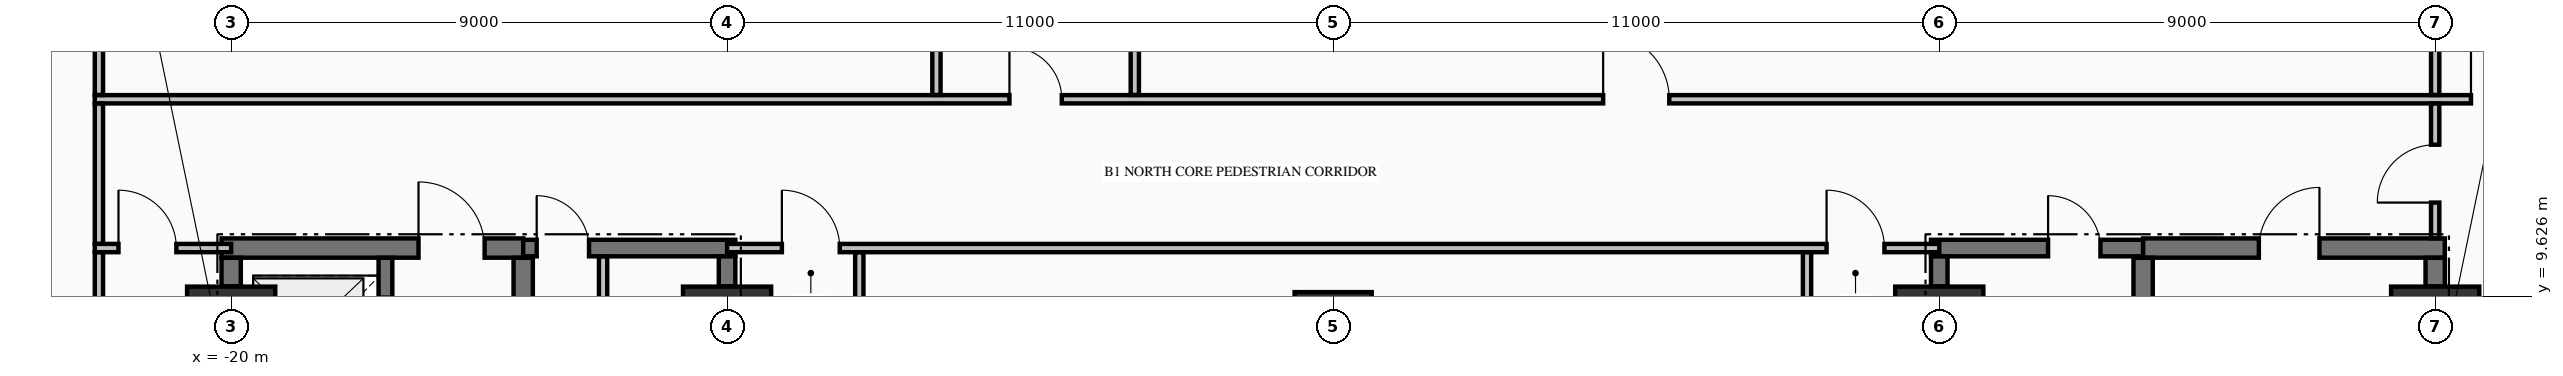
"""IFC4 building model, lengths in metres.
Left out: names, types, materials, properties, quantities, classifications, styles, units other than length and angle.
Written with IfcOpenShell. Run it as: python <this file> out.ifc"""

import sys

from ifc_helpers import new_model, si_unit, direction, frame, frame_2d, origin, origin_2d, place, context, subcontext, project, spatial, rectangle, extrude, element, fill, save


model = new_model("IFC4")
c1 = context("Model", 3, precision=1e-05, world=origin(), true_north=direction((0.0, 1.0)))
c2 = subcontext(c1, "Body", "Model", "MODEL_VIEW")
j1 = project(units=[si_unit("LENGTHUNIT", "METRE"), si_unit("PLANEANGLEUNIT", "RADIAN")], contexts=[c1])
p1 = place(None, origin())
s1 = spatial("IfcSite", under=j1, at=p1, CompositionType="ELEMENT")
p2 = place(p1, origin())
s2 = spatial("IfcBuilding", under=s1, at=p2, CompositionType="ELEMENT")
p3 = place(p2, frame((0.0, 0.0, -4.55)))
s3 = spatial("IfcBuildingStorey", under=s2, at=p3, CompositionType="ELEMENT", Elevation=-4.55)
for number, where, z_axis, x_axis in (
    (1, (-20.0, 9.0, 0.0), (0.0, 0.0, 1.0), (1.0, 0.0, 0.0)),
    (2, (-11.0, 9.0, 0.0), (0.0, 0.0, 1.0), (1.0, 0.0, 0.0)),
):
    element("IfcColumn", number, at=place(p3, frame(where, z_axis=z_axis, x_axis=x_axis)), inside=s3, PredefinedType="COLUMN", context=c2, shape_type="SweptSolid", body=[
        extrude(rectangle(XDim=1.6, YDim=1.6, at=origin_2d()), origin(), (0.0, 0.0, 1.0), 4.2),
    ])
p4 = place(p3, frame((0.0, 9.0, 0.0), z_axis=(0.0, 0.0, 1.0), x_axis=(1.0, 0.0, 0.0)))
e3 = element("IfcColumn", 3, at=p4, inside=s3, PredefinedType="COLUMN", context=c2, shape_type="SweptSolid", body=[
    extrude(rectangle(XDim=1.4, YDim=1.4, at=origin_2d()), origin(), (0.0, 0.0, 1.0), 4.2),
])
for number, where, z_axis, x_axis in (
    (4, (11.0, 9.0, 0.0), (0.0, 0.0, 1.0), (1.0, 0.0, 0.0)),
    (5, (20.0, 9.0, 0.0), (0.0, 0.0, 1.0), (1.0, 0.0, 0.0)),
):
    element("IfcColumn", number, at=place(p3, frame(where, z_axis=z_axis, x_axis=x_axis)), inside=s3, PredefinedType="COLUMN", context=c2, shape_type="SweptSolid", body=[
        extrude(rectangle(XDim=1.6, YDim=1.6, at=origin_2d()), origin(), (0.0, 0.0, 1.0), 4.2),
    ])
p5 = place(p3, frame((-20.175, 10.5, 0.0), z_axis=(0.0, 0.0, 1.0), x_axis=(1.0, 0.0, 0.0)))
e6 = element("IfcWall", 6, at=p5, inside=s3, PredefinedType="SHEAR", context=c2, shape_type="SweptSolid", body=[
    extrude(rectangle(XDim=5.475, YDim=0.35, at=frame_2d((2.738, 0.0))), origin(), (0.0, 0.0, 1.0), 4.2),
])
p6 = place(p5, frame((3.575, 0.0, 0.0)))
e7 = element("IfcOpeningElement", 7, at=p6, cuts=e6, PredefinedType="OPENING", context=c2, shape_type="SweptSolid", body=[
    extrude(rectangle(XDim=1.2, YDim=2.15, at=frame_2d((0.6, 1.075))), frame((0.0, 0.185, 0.0), z_axis=(0.0, -1.0, 0.0), x_axis=(1.0, 0.0, 0.0)), (0.0, 0.0, 1.0), 0.37),
])
p7 = place(p3, frame((-14.7, 10.5, 0.0), z_axis=(0.0, 0.0, 1.0), x_axis=(1.0, 0.0, 0.0)))
e8 = element("IfcWall", 8, at=p7, inside=s3, PredefinedType="SHEAR", context=c2, shape_type="SweptSolid", body=[
    extrude(rectangle(XDim=3.85, YDim=0.3, at=frame_2d((1.925, 0.0))), origin(), (0.0, 0.0, 1.0), 4.2),
])
p8 = place(p7, frame((0.245, 0.0, 0.0)))
e9 = element("IfcOpeningElement", 9, at=p8, cuts=e8, PredefinedType="OPENING", context=c2, shape_type="SweptSolid", body=[
    extrude(rectangle(XDim=0.95, YDim=2.15, at=frame_2d((0.475, 1.075))), frame((0.0, 0.16, 0.0), z_axis=(0.0, -1.0, 0.0), x_axis=(1.0, 0.0, 0.0)), (0.0, 0.0, 1.0), 0.32),
])
p9 = place(p3, frame((10.85, 10.5, 0.0), z_axis=(0.0, 0.0, 1.0), x_axis=(1.0, 0.0, 0.0)))
e10 = element("IfcWall", 10, at=p9, inside=s3, PredefinedType="SHEAR", context=c2, shape_type="SweptSolid", body=[
    extrude(rectangle(XDim=3.85, YDim=0.3, at=frame_2d((1.925, 0.0))), origin(), (0.0, 0.0, 1.0), 4.2),
])
p10 = place(p9, frame((2.125, 0.0, 0.0)))
e11 = element("IfcOpeningElement", 11, at=p10, cuts=e10, PredefinedType="OPENING", context=c2, shape_type="SweptSolid", body=[
    extrude(rectangle(XDim=0.95, YDim=2.15, at=frame_2d((0.475, 1.075))), frame((0.0, 0.16, 0.0), z_axis=(0.0, -1.0, 0.0), x_axis=(1.0, 0.0, 0.0)), (0.0, 0.0, 1.0), 0.32),
])
p11 = place(p3, frame((14.7, 10.5, 0.0), z_axis=(0.0, 0.0, 1.0), x_axis=(1.0, 0.0, 0.0)))
e12 = element("IfcWall", 12, at=p11, inside=s3, PredefinedType="SHEAR", context=c2, shape_type="SweptSolid", body=[
    extrude(rectangle(XDim=5.475, YDim=0.35, at=frame_2d((2.738, 0.0))), origin(), (0.0, 0.0, 1.0), 4.2),
])
p12 = place(p11, frame((2.1, 0.0, 0.0)))
e13 = element("IfcOpeningElement", 13, at=p12, cuts=e12, PredefinedType="OPENING", context=c2, shape_type="SweptSolid", body=[
    extrude(rectangle(XDim=1.1, YDim=2.15, at=frame_2d((0.55, 1.075))), frame((0.0, 0.185, 0.0), z_axis=(0.0, -1.0, 0.0), x_axis=(1.0, 0.0, 0.0)), (0.0, 0.0, 1.0), 0.37),
])
p13 = place(p3, frame((-22.475, 10.5, 0.0), z_axis=(0.0, 0.0, 1.0), x_axis=(1.0, 0.0, 0.0)))
e14 = element("IfcWall", 14, at=p13, inside=s3, PredefinedType="PARTITIONING", context=c2, shape_type="SweptSolid", body=[
    extrude(rectangle(XDim=2.475, YDim=0.15, at=frame_2d((1.238, 0.0))), origin(), (0.0, 0.0, 1.0), 4.2),
])
p14 = place(p13, frame((0.43, 0.0, 0.0)))
e15 = element("IfcOpeningElement", 15, at=p14, cuts=e14, PredefinedType="OPENING", context=c2, shape_type="SweptSolid", body=[
    extrude(rectangle(XDim=1.05, YDim=2.15, at=frame_2d((0.525, 1.075))), frame((0.0, 0.085, 0.0), z_axis=(0.0, -1.0, 0.0), x_axis=(1.0, 0.0, 0.0)), (0.0, 0.0, 1.0), 0.17),
])
p15 = place(p3, frame((-11.0, 10.5, 0.0), z_axis=(0.0, 0.0, 1.0), x_axis=(1.0, 0.0, 0.0)))
e16 = element("IfcWall", 16, at=p15, inside=s3, PredefinedType="PARTITIONING", context=c2, shape_type="SweptSolid", body=[
    extrude(rectangle(XDim=22.0, YDim=0.15, at=frame_2d((11.0, 0.0))), origin(), (0.0, 0.0, 1.0), 4.2),
])
p16 = place(p15, frame((0.995, 0.0, 0.0)))
e17 = element("IfcOpeningElement", 17, at=p16, cuts=e16, PredefinedType="OPENING", context=c2, shape_type="SweptSolid", body=[
    extrude(rectangle(XDim=1.05, YDim=2.15, at=frame_2d((0.525, 1.075))), frame((0.0, 0.085, 0.0), z_axis=(0.0, -1.0, 0.0), x_axis=(1.0, 0.0, 0.0)), (0.0, 0.0, 1.0), 0.17),
])
p17 = place(p15, frame((19.955, 0.0, 0.0)))
e18 = element("IfcOpeningElement", 18, at=p17, cuts=e16, PredefinedType="OPENING", context=c2, shape_type="SweptSolid", body=[
    extrude(rectangle(XDim=1.05, YDim=2.15, at=frame_2d((0.525, 1.075))), frame((0.0, 0.085, 0.0), z_axis=(0.0, -1.0, 0.0), x_axis=(1.0, 0.0, 0.0)), (0.0, 0.0, 1.0), 0.17),
])
p18 = place(p3, frame((-22.475, 13.2, 0.0), z_axis=(0.0, 0.0, 1.0), x_axis=(1.0, 0.0, 0.0)))
e19 = element("IfcWall", 19, at=p18, inside=s3, PredefinedType="PARTITIONING", context=c2, shape_type="SweptSolid", body=[
    extrude(rectangle(XDim=56.197, YDim=0.15, at=frame_2d((28.099, 0.0))), origin(), (0.0, 0.0, 1.0), 4.2),
])
p19 = place(p18, frame((43.125, 0.0, 0.0)))
e20 = element("IfcOpeningElement", 20, at=p19, cuts=e19, PredefinedType="OPENING", context=c2, shape_type="SweptSolid", body=[
    extrude(rectangle(XDim=1.1, YDim=2.15, at=frame_2d((0.55, 1.075))), frame((0.0, 0.085, 0.0), z_axis=(0.0, -1.0, 0.0), x_axis=(1.0, 0.0, 0.0)), (0.0, 0.0, 1.0), 0.17),
])
p20 = place(p18, frame((27.375, 0.0, 0.0)))
e21 = element("IfcOpeningElement", 21, at=p20, cuts=e19, PredefinedType="OPENING", context=c2, shape_type="SweptSolid", body=[
    extrude(rectangle(XDim=1.2, YDim=2.15, at=frame_2d((0.6, 1.075))), frame((0.0, 0.085, 0.0), z_axis=(0.0, -1.0, 0.0), x_axis=(1.0, 0.0, 0.0)), (0.0, 0.0, 1.0), 0.17),
])
p21 = place(p18, frame((46.375, 0.0, 0.0)))
e22 = element("IfcOpeningElement", 22, at=p21, cuts=e19, PredefinedType="OPENING", context=c2, shape_type="SweptSolid", body=[
    extrude(rectangle(XDim=1.2, YDim=2.15, at=frame_2d((0.6, 1.075))), frame((0.0, 0.085, 0.0), z_axis=(0.0, -1.0, 0.0), x_axis=(1.0, 0.0, 0.0)), (0.0, 0.0, 1.0), 0.17),
])
p22 = place(p18, frame((16.6, 0.0, 0.0)))
e23 = element("IfcOpeningElement", 23, at=p22, cuts=e19, PredefinedType="OPENING", context=c2, shape_type="SweptSolid", body=[
    extrude(rectangle(XDim=0.95, YDim=2.15, at=frame_2d((0.475, 1.075))), frame((0.0, 0.085, 0.0), z_axis=(0.0, -1.0, 0.0), x_axis=(1.0, 0.0, 0.0)), (0.0, 0.0, 1.0), 0.17),
])
p23 = place(p3, frame((-20.0, 9.804, 0.0), z_axis=(0.0, 0.0, 1.0), x_axis=(0.0, 1.0, 0.0)))
e24 = element("IfcWall", 24, at=p23, inside=s3, PredefinedType="SHEAR", context=c2, shape_type="SweptSolid", body=[
    extrude(rectangle(XDim=0.519, YDim=0.35, at=frame_2d((0.26, 0.0))), origin(), (0.0, 0.0, 1.0), 4.2),
])
p24 = place(p3, frame((-17.2, 7.727, 0.0), z_axis=(0.0, 0.0, 1.0), x_axis=(0.0, 1.0, 0.0)))
e25 = element("IfcWall", 25, at=p24, inside=s3, PredefinedType="SOLIDWALL", context=c2, shape_type="SweptSolid", body=[
    extrude(rectangle(XDim=2.596, YDim=0.25, at=frame_2d((1.298, 0.0))), origin(), (0.0, 0.0, 1.0), 4.2),
])
p25 = place(p24, frame((0.773, 0.0, 0.0)))
e26 = element("IfcOpeningElement", 26, at=p25, cuts=e25, PredefinedType="OPENING", context=c2, shape_type="SweptSolid", body=[
    extrude(rectangle(XDim=1.1, YDim=2.2, at=frame_2d((0.55, 1.1))), frame((0.0, 0.135, 0.0), z_axis=(0.0, -1.0, 0.0), x_axis=(1.0, 0.0, 0.0)), (0.0, 0.0, 1.0), 0.27),
])
p26 = place(p3, frame((-14.7, 5.852, 0.0), z_axis=(0.0, 0.0, 1.0), x_axis=(0.0, 1.0, 0.0)))
e27 = element("IfcWall", 27, at=p26, inside=s3, PredefinedType="SHEAR", context=c2, shape_type="SweptSolid", body=[
    extrude(rectangle(XDim=4.471, YDim=0.35, at=frame_2d((2.235, 0.0))), origin(), (0.0, 0.0, 1.0), 4.2),
])
for number, where, z_axis, x_axis in (
    (28, (-11.0, 9.804, 0.0), (0.0, 0.0, 1.0), (0.0, 1.0, 0.0)),
    (29, (11.0, 9.804, 0.0), (0.0, 0.0, 1.0), (0.0, 1.0, 0.0)),
):
    element("IfcWall", number, at=place(p3, frame(where, z_axis=z_axis, x_axis=x_axis)), inside=s3, PredefinedType="SHEAR", context=c2, shape_type="SweptSolid", body=[
        extrude(rectangle(XDim=0.544, YDim=0.3, at=frame_2d((0.272, 0.0))), origin(), (0.0, 0.0, 1.0), 4.2),
    ])
p27 = place(p3, frame((14.7, 5.852, 0.0), z_axis=(0.0, 0.0, 1.0), x_axis=(0.0, 1.0, 0.0)))
e30 = element("IfcWall", 30, at=p27, inside=s3, PredefinedType="SHEAR", context=c2, shape_type="SweptSolid", body=[
    extrude(rectangle(XDim=4.471, YDim=0.35, at=frame_2d((2.235, 0.0))), origin(), (0.0, 0.0, 1.0), 4.2),
])
p28 = place(p3, frame((20.0, 9.804, 0.0), z_axis=(0.0, 0.0, 1.0), x_axis=(0.0, 1.0, 0.0)))
e31 = element("IfcWall", 31, at=p28, inside=s3, PredefinedType="SHEAR", context=c2, shape_type="SweptSolid", body=[
    extrude(rectangle(XDim=0.519, YDim=0.35, at=frame_2d((0.26, 0.0))), origin(), (0.0, 0.0, 1.0), 4.2),
])
p29 = place(p3, frame((-22.4, -0.647, 0.0), z_axis=(0.0, 0.0, 1.0), x_axis=(0.0, 1.0, 0.0)))
e32 = element("IfcWall", 32, at=p29, inside=s3, PredefinedType="PARTITIONING", context=c2, shape_type="SweptSolid", body=[
    extrude(rectangle(XDim=11.069, YDim=0.15, at=frame_2d((5.535, 0.0))), origin(), (0.0, 0.0, 1.0), 4.2),
])
p30 = place(p29, frame((4.547, 0.0, 0.0)))
e33 = element("IfcOpeningElement", 33, at=p30, cuts=e32, PredefinedType="OPENING", context=c2, shape_type="SweptSolid", body=[
    extrude(rectangle(XDim=1.2, YDim=2.15, at=frame_2d((0.6, 1.075))), frame((0.0, 0.085, 0.0), z_axis=(0.0, -1.0, 0.0), x_axis=(1.0, 0.0, 0.0)), (0.0, 0.0, 1.0), 0.17),
])
p31 = place(p3, frame((-22.4, 10.578, 0.0), z_axis=(0.0, 0.0, 1.0), x_axis=(0.0, 1.0, 0.0)))
e34 = element("IfcWall", 34, at=p31, inside=s3, PredefinedType="PARTITIONING", context=c2, shape_type="SweptSolid", body=[
    extrude(rectangle(XDim=2.544, YDim=0.15, at=frame_2d((1.272, 0.0))), origin(), (0.0, 0.0, 1.0), 4.2),
])
p32 = place(p3, frame((-22.4, 13.278, 0.0), z_axis=(0.0, 0.0, 1.0), x_axis=(0.0, 1.0, 0.0)))
e35 = element("IfcWall", 35, at=p32, inside=s3, PredefinedType="PARTITIONING", context=c2, shape_type="SweptSolid", body=[
    extrude(rectangle(XDim=3.244, YDim=0.15, at=frame_2d((1.622, 0.0))), origin(), (0.0, 0.0, 1.0), 4.2),
])
p33 = place(p3, frame((-13.25, 5.853, 0.0), z_axis=(0.0, 0.0, 1.0), x_axis=(0.0, 1.0, 0.0)))
e36 = element("IfcWall", 36, at=p33, inside=s3, PredefinedType="PARTITIONING", context=c2, shape_type="SweptSolid", body=[
    extrude(rectangle(XDim=4.494, YDim=0.15, at=frame_2d((2.247, 0.0))), origin(), (0.0, 0.0, 1.0), 4.2),
])
p34 = place(p33, frame((1.472, 0.0, 0.0)))
e37 = element("IfcOpeningElement", 37, at=p34, cuts=e36, PredefinedType="OPENING", context=c2, shape_type="SweptSolid", body=[
    extrude(rectangle(XDim=0.95, YDim=2.15, at=frame_2d((0.475, 1.075))), frame((0.0, 0.085, 0.0), z_axis=(0.0, -1.0, 0.0), x_axis=(1.0, 0.0, 0.0)), (0.0, 0.0, 1.0), 0.17),
])
p35 = place(p3, frame((-8.6, 0.606, 0.0), z_axis=(0.0, 0.0, 1.0), x_axis=(0.0, 1.0, 0.0)))
e38 = element("IfcWall", 38, at=p35, inside=s3, PredefinedType="PARTITIONING", context=c2, shape_type="SweptSolid", body=[
    extrude(rectangle(XDim=9.816, YDim=0.15, at=frame_2d((4.908, 0.0))), origin(), (0.0, 0.0, 1.0), 3.242),
])
p36 = place(p35, frame((3.344, 0.0, 0.0)))
e39 = element("IfcOpeningElement", 39, at=p36, cuts=e38, PredefinedType="OPENING", context=c2, shape_type="SweptSolid", body=[
    extrude(rectangle(XDim=1.1, YDim=2.15, at=frame_2d((0.55, 1.075))), frame((0.0, 0.085, 0.0), z_axis=(0.0, -1.0, 0.0), x_axis=(1.0, 0.0, 0.0)), (0.0, 0.0, 1.0), 0.17),
])
for number, where, z_axis, x_axis in (
    (40, (-7.2, 13.278, 0.0), (0.0, 0.0, 1.0), (0.0, 1.0, 0.0)),
    (41, (-3.6, 13.278, 0.0), (0.0, 0.0, 1.0), (0.0, 1.0, 0.0)),
):
    element("IfcWall", number, at=place(p3, frame(where, z_axis=z_axis, x_axis=x_axis)), inside=s3, PredefinedType="PARTITIONING", context=c2, shape_type="SweptSolid", body=[
        extrude(rectangle(XDim=3.044, YDim=0.15, at=frame_2d((1.522, 0.0))), origin(), (0.0, 0.0, 1.0), 4.2),
    ])
p37 = place(p3, frame((8.6, 0.606, 0.0), z_axis=(0.0, 0.0, 1.0), x_axis=(0.0, 1.0, 0.0)))
e42 = element("IfcWall", 42, at=p37, inside=s3, PredefinedType="PARTITIONING", context=c2, shape_type="SweptSolid", body=[
    extrude(rectangle(XDim=9.816, YDim=0.15, at=frame_2d((4.908, 0.0))), origin(), (0.0, 0.0, 1.0), 3.242),
])
p38 = place(p37, frame((3.344, 0.0, 0.0)))
e43 = element("IfcOpeningElement", 43, at=p38, cuts=e42, PredefinedType="OPENING", context=c2, shape_type="SweptSolid", body=[
    extrude(rectangle(XDim=1.1, YDim=2.15, at=frame_2d((0.55, 1.075))), frame((0.0, 0.085, 0.0), z_axis=(0.0, -1.0, 0.0), x_axis=(1.0, 0.0, 0.0)), (0.0, 0.0, 1.0), 0.17),
])
p39 = place(p3, frame((20.0, 10.678, 0.0), z_axis=(0.0, 0.0, 1.0), x_axis=(0.0, 1.0, 0.0)))
e44 = element("IfcWall", 44, at=p39, inside=s3, PredefinedType="PARTITIONING", context=c2, shape_type="SweptSolid", body=[
    extrude(rectangle(XDim=2.444, YDim=0.15, at=frame_2d((1.222, 0.0))), origin(), (0.0, 0.0, 1.0), 3.242),
])
p40 = place(p39, frame((0.647, 0.0, 0.0)))
e45 = element("IfcOpeningElement", 45, at=p40, cuts=e44, PredefinedType="OPENING", context=c2, shape_type="SweptSolid", body=[
    extrude(rectangle(XDim=1.05, YDim=2.15, at=frame_2d((0.525, 1.075))), frame((0.0, 0.085, 0.0), z_axis=(0.0, -1.0, 0.0), x_axis=(1.0, 0.0, 0.0)), (0.0, 0.0, 1.0), 0.17),
])
p41 = place(p3, frame((20.0, 13.278, 0.0), z_axis=(0.0, 0.0, 1.0), x_axis=(0.0, 1.0, 0.0)))
e46 = element("IfcWall", 46, at=p41, inside=s3, PredefinedType="PARTITIONING", context=c2, shape_type="SweptSolid", body=[
    extrude(rectangle(XDim=1.916, YDim=0.15, at=frame_2d((0.958, 0.0))), origin(), (0.0, 0.0, 1.0), 3.242),
])
p42 = place(p8, origin())
e47 = element("IfcDoor", 47, at=p42, inside=s3, OperationType="SINGLE_SWING_LEFT", PredefinedType="DOOR", context=c2, shape_type="SweptSolid", body=[
    extrude(rectangle(XDim=0.95, YDim=2.15, at=frame_2d((0.475, 1.075))), frame((0.0, 0.025, 0.0), z_axis=(0.0, -1.0, 0.0), x_axis=(1.0, 0.0, 0.0)), (0.0, 0.0, 1.0), 0.05),
])
fill(e9, e47)
p43 = place(p10, origin())
e48 = element("IfcDoor", 48, at=p43, inside=s3, OperationType="SINGLE_SWING_LEFT", PredefinedType="DOOR", context=c2, shape_type="SweptSolid", body=[
    extrude(rectangle(XDim=0.95, YDim=2.15, at=frame_2d((0.475, 1.075))), frame((0.0, 0.025, 0.0), z_axis=(0.0, -1.0, 0.0), x_axis=(1.0, 0.0, 0.0)), (0.0, 0.0, 1.0), 0.05),
])
fill(e11, e48)
p44 = place(p6, origin())
e49 = element("IfcDoor", 49, at=p44, inside=s3, OperationType="SINGLE_SWING_LEFT", PredefinedType="DOOR", context=c2, shape_type="SweptSolid", body=[
    extrude(rectangle(XDim=1.2, YDim=2.15, at=frame_2d((0.6, 1.075))), frame((0.0, 0.025, 0.0), z_axis=(0.0, -1.0, 0.0), x_axis=(1.0, 0.0, 0.0)), (0.0, 0.0, 1.0), 0.05),
])
fill(e7, e49)
p45 = place(p12, origin())
e50 = element("IfcDoor", 50, at=p45, inside=s3, OperationType="SINGLE_SWING_RIGHT", PredefinedType="DOOR", context=c2, shape_type="SweptSolid", body=[
    extrude(rectangle(XDim=1.1, YDim=2.15, at=frame_2d((0.55, 1.075))), frame((0.0, 0.025, 0.0), z_axis=(0.0, -1.0, 0.0), x_axis=(1.0, 0.0, 0.0)), (0.0, 0.0, 1.0), 0.05),
])
fill(e13, e50)
p46 = place(p16, origin())
e51 = element("IfcDoor", 51, at=p46, inside=s3, OperationType="SINGLE_SWING_LEFT", PredefinedType="DOOR", context=c2, shape_type="SweptSolid", body=[
    extrude(rectangle(XDim=1.05, YDim=2.15, at=frame_2d((0.525, 1.075))), frame((0.0, 0.025, 0.0), z_axis=(0.0, -1.0, 0.0), x_axis=(1.0, 0.0, 0.0)), (0.0, 0.0, 1.0), 0.05),
])
fill(e17, e51)
p47 = place(p17, origin())
e52 = element("IfcDoor", 52, at=p47, inside=s3, OperationType="SINGLE_SWING_LEFT", PredefinedType="DOOR", context=c2, shape_type="SweptSolid", body=[
    extrude(rectangle(XDim=1.05, YDim=2.15, at=frame_2d((0.525, 1.075))), frame((0.0, 0.025, 0.0), z_axis=(0.0, -1.0, 0.0), x_axis=(1.0, 0.0, 0.0)), (0.0, 0.0, 1.0), 0.05),
])
fill(e18, e52)
p48 = place(p14, origin())
e53 = element("IfcDoor", 53, at=p48, inside=s3, OperationType="SINGLE_SWING_LEFT", PredefinedType="DOOR", context=c2, shape_type="SweptSolid", body=[
    extrude(rectangle(XDim=1.05, YDim=2.15, at=frame_2d((0.525, 1.075))), frame((0.0, 0.025, 0.0), z_axis=(0.0, -1.0, 0.0), x_axis=(1.0, 0.0, 0.0)), (0.0, 0.0, 1.0), 0.05),
])
fill(e15, e53)
p49 = place(p40, origin())
e54 = element("IfcDoor", 54, at=p49, inside=s3, OperationType="SINGLE_SWING_LEFT", PredefinedType="DOOR", context=c2, shape_type="SweptSolid", body=[
    extrude(rectangle(XDim=1.05, YDim=2.15, at=frame_2d((0.525, 1.075))), frame((0.0, 0.025, 0.0), z_axis=(0.0, -1.0, 0.0), x_axis=(1.0, 0.0, 0.0)), (0.0, 0.0, 1.0), 0.05),
])
fill(e45, e54)
p50 = place(p19, origin())
e55 = element("IfcDoor", 55, at=p50, inside=s3, OperationType="SINGLE_SWING_LEFT", PredefinedType="DOOR", context=c2, shape_type="SweptSolid", body=[
    extrude(rectangle(XDim=1.1, YDim=2.15, at=frame_2d((0.55, 1.075))), frame((0.0, 0.025, 0.0), z_axis=(0.0, -1.0, 0.0), x_axis=(1.0, 0.0, 0.0)), (0.0, 0.0, 1.0), 0.05),
])
fill(e20, e55)
p51 = place(p20, origin())
e56 = element("IfcDoor", 56, at=p51, inside=s3, OperationType="SINGLE_SWING_LEFT", PredefinedType="DOOR", context=c2, shape_type="SweptSolid", body=[
    extrude(rectangle(XDim=1.2, YDim=2.15, at=frame_2d((0.6, 1.075))), frame((0.0, 0.025, 0.0), z_axis=(0.0, -1.0, 0.0), x_axis=(1.0, 0.0, 0.0)), (0.0, 0.0, 1.0), 0.05),
])
fill(e21, e56)
p52 = place(p22, origin())
e57 = element("IfcDoor", 57, at=p52, inside=s3, OperationType="SINGLE_SWING_LEFT", PredefinedType="DOOR", context=c2, shape_type="SweptSolid", body=[
    extrude(rectangle(XDim=0.95, YDim=2.15, at=frame_2d((0.475, 1.075))), frame((0.0, 0.025, 0.0), z_axis=(0.0, -1.0, 0.0), x_axis=(1.0, 0.0, 0.0)), (0.0, 0.0, 1.0), 0.05),
])
fill(e23, e57)
save(model, sys.argv[1])
